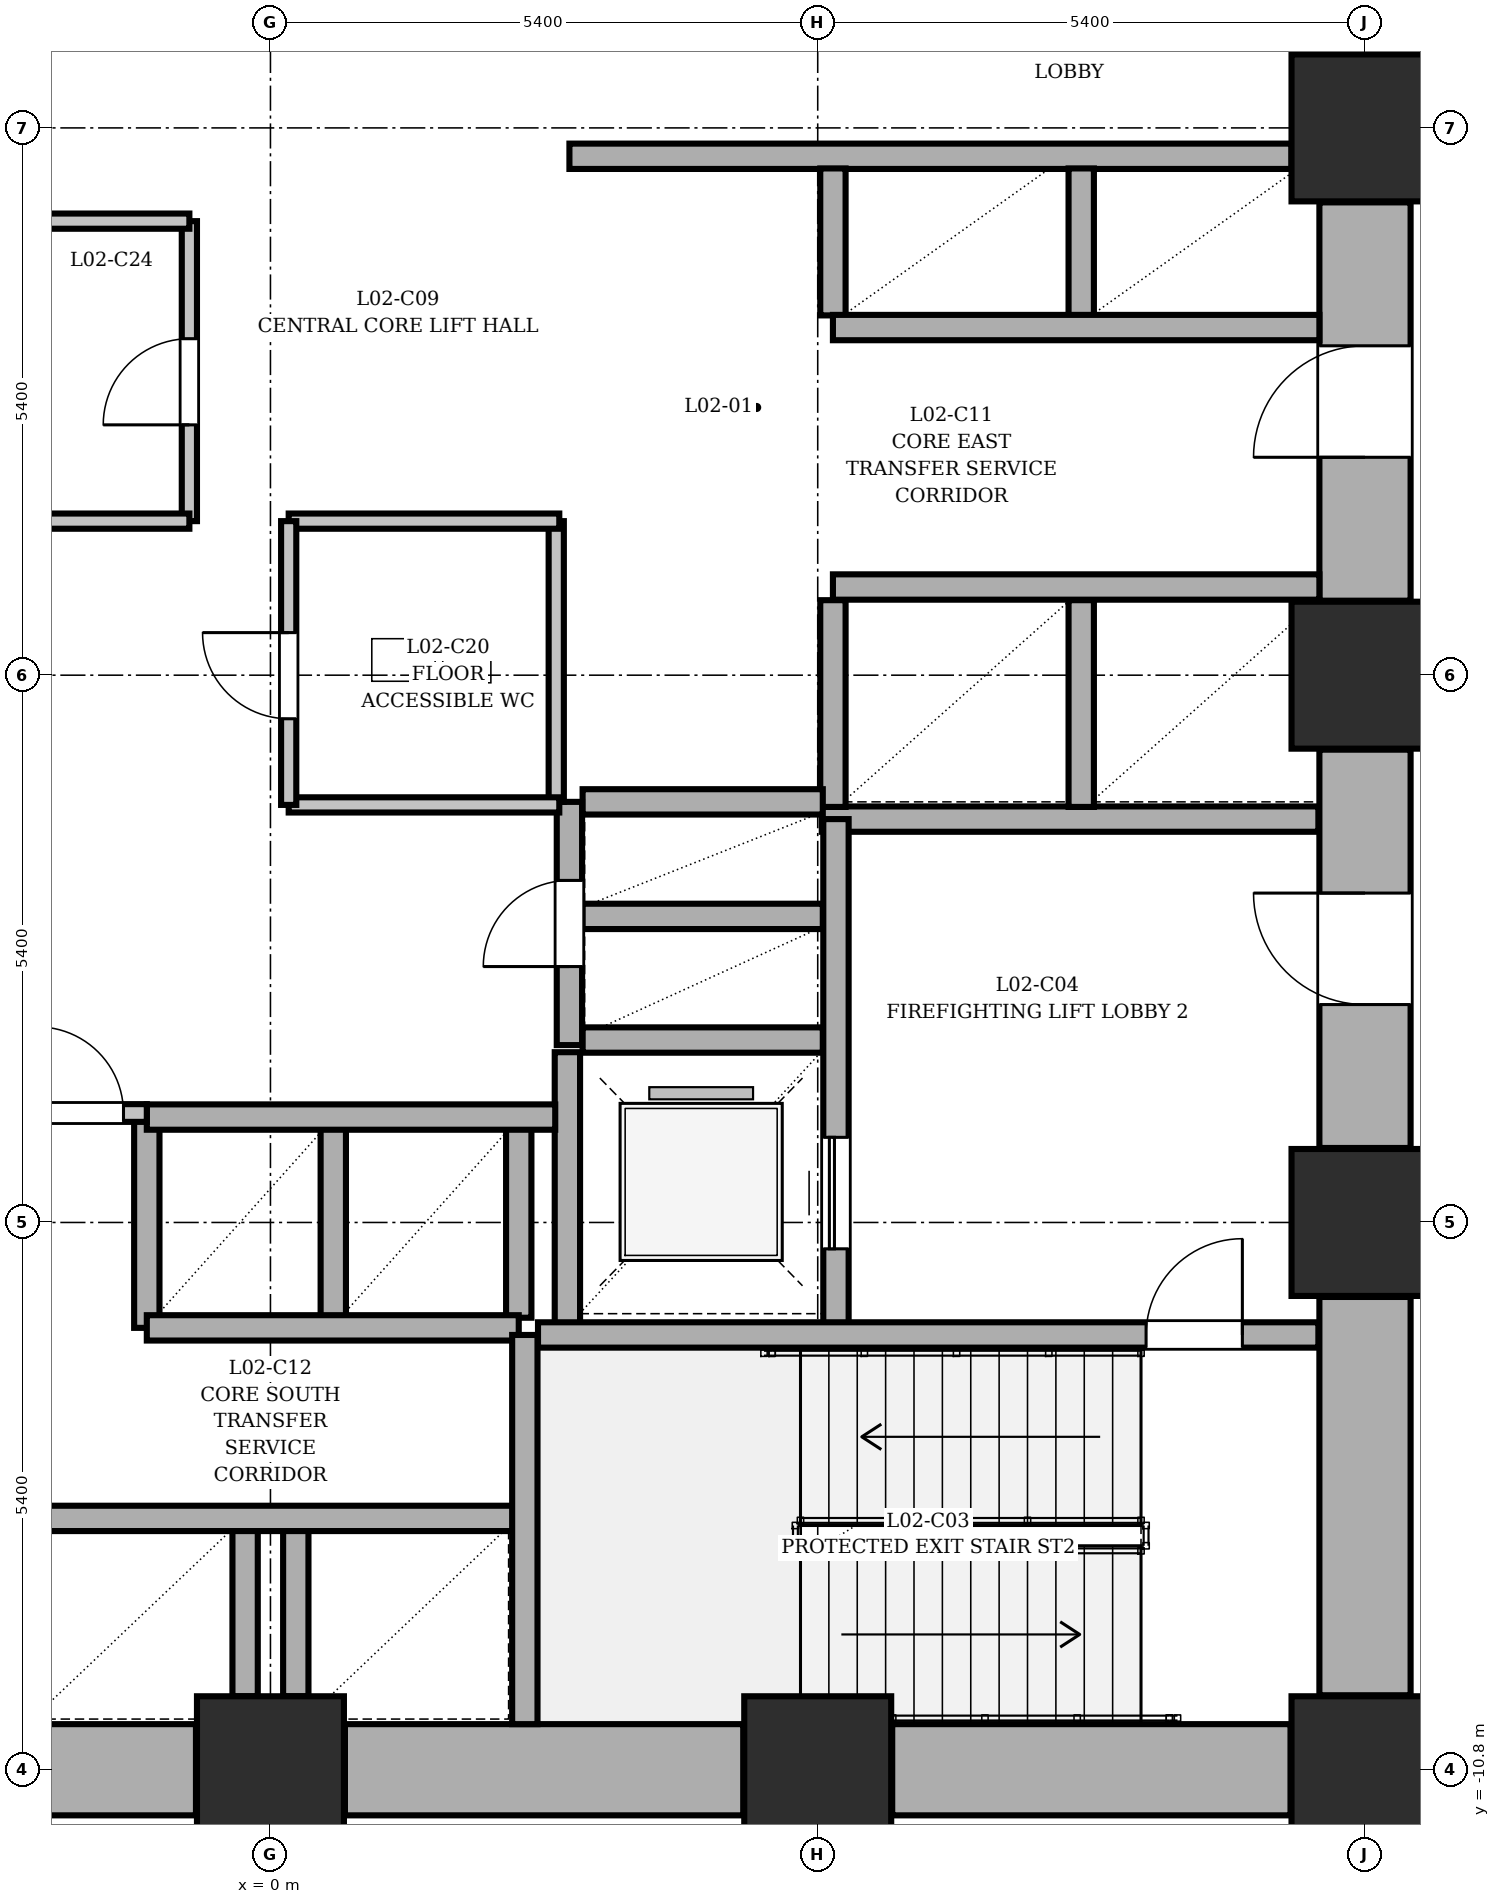
"""IFC4 building model, lengths in metres.
Left out: names, types, materials, properties, quantities, classifications, styles, units other than length and angle.
Written with IfcOpenShell. Run it as: python <this file> out.ifc"""

import sys

from ifc_helpers import new_model, si_unit, direction, frame, frame_2d, origin, origin_2d, place, context, subcontext, project, spatial, rectangle, extrude, element, fill, save


model = new_model("IFC4")
c1 = context("Model", 3, precision=1e-05, world=origin(), true_north=direction((0.0, 1.0)))
c2 = subcontext(c1, "Body", "Model", "MODEL_VIEW")
j1 = project(units=[si_unit("LENGTHUNIT", "METRE"), si_unit("PLANEANGLEUNIT", "RADIAN")], contexts=[c1])
p1 = place(None, origin())
s1 = spatial("IfcSite", under=j1, at=p1, CompositionType="ELEMENT")
p2 = place(p1, origin())
s2 = spatial("IfcBuilding", under=s1, at=p2, CompositionType="ELEMENT")
p3 = place(p2, frame((0.0, 0.0, 9.0)))
s3 = spatial("IfcBuildingStorey", under=s2, at=p3, CompositionType="ELEMENT", Elevation=9.0)
for number, where, z_axis, x_axis in (
    (1, (0.0, -10.8, 0.0), (0.0, 0.0, 1.0), (1.0, 0.0, 0.0)),
    (2, (5.4, -10.8, 0.0), (0.0, 0.0, 1.0), (1.0, 0.0, 0.0)),
    (3, (10.8, -10.8, 0.0), (0.0, 0.0, 1.0), (1.0, 0.0, 0.0)),
    (4, (10.8, -5.4, 0.0), (0.0, 0.0, 1.0), (1.0, 0.0, 0.0)),
    (5, (10.8, 0.0, 0.0), (0.0, 0.0, 1.0), (1.0, 0.0, 0.0)),
    (6, (10.8, 5.4, 0.0), (0.0, 0.0, 1.0), (1.0, 0.0, 0.0)),
):
    element("IfcColumn", number, at=place(p3, frame(where, z_axis=z_axis, x_axis=x_axis)), inside=s3, PredefinedType="COLUMN", context=c2, shape_type="SweptSolid", body=[
        extrude(rectangle(XDim=1.45, YDim=1.45, at=origin_2d()), origin(), (0.0, 0.0, 1.0), 4.5),
    ])
for number, where, z_axis, x_axis in (
    (7, (10.8, -10.065, 0.0), (0.0, 0.0, 1.0), (0.0, 1.0, 0.0)),
    (8, (-4.665, -10.8, 0.0), (0.0, 0.0, 1.0), (1.0, 0.0, 0.0)),
):
    element("IfcWall", number, at=place(p3, frame(where, z_axis=z_axis, x_axis=x_axis)), inside=s3, PredefinedType="SHEAR", context=c2, shape_type="SweptSolid", body=[
        extrude(rectangle(XDim=3.93, YDim=0.9, at=frame_2d((1.965, 0.0))), origin(), (0.0, 0.0, 1.0), 4.5),
    ])
p4 = place(p3, frame((10.8, -4.665, 0.0), z_axis=(0.0, 0.0, 1.0), x_axis=(0.0, 1.0, 0.0)))
e9 = element("IfcWall", 9, at=p4, inside=s3, PredefinedType="SHEAR", context=c2, shape_type="SweptSolid", body=[
    extrude(rectangle(XDim=3.93, YDim=0.9, at=frame_2d((1.965, 0.0))), origin(), (0.0, 0.0, 1.0), 4.5),
])
p5 = place(p4, frame((1.415, 0.0, 0.0)))
e10 = element("IfcOpeningElement", 10, at=p5, cuts=e9, PredefinedType="OPENING", context=c2, shape_type="SweptSolid", body=[
    extrude(rectangle(XDim=1.1, YDim=2.1, at=frame_2d((0.55, 1.05))), frame((0.0, 0.46, 0.0), z_axis=(0.0, -1.0, 0.0), x_axis=(1.0, 0.0, 0.0)), (0.0, 0.0, 1.0), 0.92),
])
p6 = place(p3, frame((0.735, -10.8, 0.0), z_axis=(0.0, 0.0, 1.0), x_axis=(1.0, 0.0, 0.0)))
e11 = element("IfcWall", 11, at=p6, inside=s3, PredefinedType="SHEAR", context=c2, shape_type="SweptSolid", body=[
    extrude(rectangle(XDim=3.93, YDim=0.9, at=frame_2d((1.965, 0.0))), origin(), (0.0, 0.0, 1.0), 4.5),
])
p7 = place(p3, frame((10.8, 0.735, 0.0), z_axis=(0.0, 0.0, 1.0), x_axis=(0.0, 1.0, 0.0)))
e12 = element("IfcWall", 12, at=p7, inside=s3, PredefinedType="SHEAR", context=c2, shape_type="SweptSolid", body=[
    extrude(rectangle(XDim=3.93, YDim=0.9, at=frame_2d((1.965, 0.0))), origin(), (0.0, 0.0, 1.0), 4.5),
])
p8 = place(p7, frame((1.415, 0.0, 0.0)))
e13 = element("IfcOpeningElement", 13, at=p8, cuts=e12, PredefinedType="OPENING", context=c2, shape_type="SweptSolid", body=[
    extrude(rectangle(XDim=1.1, YDim=2.1, at=frame_2d((0.55, 1.05))), frame((0.0, 0.46, 0.0), z_axis=(0.0, -1.0, 0.0), x_axis=(1.0, 0.0, 0.0)), (0.0, 0.0, 1.0), 0.92),
])
for number, where, z_axis, x_axis in (
    (14, (6.135, -10.8, 0.0), (0.0, 0.0, 1.0), (1.0, 0.0, 0.0)),
    (15, (10.8, 6.135, 0.0), (0.0, 0.0, 1.0), (0.0, 1.0, 0.0)),
):
    element("IfcWall", number, at=place(p3, frame(where, z_axis=z_axis, x_axis=x_axis)), inside=s3, PredefinedType="SHEAR", context=c2, shape_type="SweptSolid", body=[
        extrude(rectangle(XDim=3.93, YDim=0.9, at=frame_2d((1.965, 0.0))), origin(), (0.0, 0.0, 1.0), 4.5),
    ])
p9 = place(p3, frame((2.93, -6.51, 0.0), z_axis=(0.0, 0.0, 1.0), x_axis=(0.0, 1.0, 0.0)))
e16 = element("IfcWall", 16, at=p9, inside=s3, PredefinedType="SHEAR", context=c2, shape_type="SweptSolid", body=[
    extrude(rectangle(XDim=2.79, YDim=0.25, at=frame_2d((1.395, 0.0))), origin(), (0.0, 0.0, 1.0), 4.5),
])
p10 = place(p3, frame((5.44, -1.42, 0.0), z_axis=(0.0, 0.0, 1.0), x_axis=(1.0, 0.0, 0.0)))
e17 = element("IfcWall", 17, at=p10, inside=s3, PredefinedType="SHEAR", context=c2, shape_type="SweptSolid", body=[
    extrude(rectangle(XDim=4.9, YDim=0.25, at=frame_2d((2.45, 0.0))), origin(), (0.0, 0.0, 1.0), 4.5),
])
p11 = place(p3, frame((3.08, -3.6, 0.0), z_axis=(0.0, 0.0, 1.0), x_axis=(1.0, 0.0, 0.0)))
e18 = element("IfcWall", 18, at=p11, inside=s3, PredefinedType="SHEAR", context=c2, shape_type="SweptSolid", body=[
    extrude(rectangle(XDim=2.37, YDim=0.25, at=frame_2d((1.185, 0.0))), origin(), (0.0, 0.0, 1.0), 4.5),
])
p12 = place(p3, frame((5.58, -6.51, 0.0), z_axis=(0.0, 0.0, 1.0), x_axis=(0.0, 1.0, 0.0)))
e19 = element("IfcWall", 19, at=p12, inside=s3, PredefinedType="SHEAR", context=c2, shape_type="SweptSolid", body=[
    extrude(rectangle(XDim=5.09, YDim=0.25, at=frame_2d((2.545, 0.0))), origin(), (0.0, 0.0, 1.0), 4.5),
])
p13 = place(p12, frame((0.85, 0.0, 0.0)))
e20 = element("IfcOpeningElement", 20, at=p13, cuts=e19, PredefinedType="OPENING", context=c2, shape_type="SweptSolid", body=[
    extrude(rectangle(XDim=1.1, YDim=2.1, at=frame_2d((0.55, 1.05))), frame((0.0, 0.135, 0.0), z_axis=(0.0, -1.0, 0.0), x_axis=(1.0, 0.0, 0.0)), (0.0, 0.0, 1.0), 0.27),
])
for number, where, z_axis, x_axis in (
    (21, (0.62, -6.34, 0.0), (0.0, 0.0, 1.0), (0.0, 1.0, 0.0)),
    (22, (2.45, -6.34, 0.0), (0.0, 0.0, 1.0), (0.0, 1.0, 0.0)),
):
    element("IfcWall", number, at=place(p3, frame(where, z_axis=z_axis, x_axis=x_axis)), inside=s3, PredefinedType="SHEAR", context=c2, shape_type="SweptSolid", body=[
        extrude(rectangle(XDim=1.88, YDim=0.25, at=frame_2d((0.94, 0.0))), origin(), (0.0, 0.0, 1.0), 4.5),
    ])
for number, where, z_axis, x_axis in (
    (23, (-0.25, -10.075, 0.0), (0.0, 0.0, 1.0), (0.0, 1.0, 0.0)),
    (24, (0.25, -10.075, 0.0), (0.0, 0.0, 1.0), (0.0, 1.0, 0.0)),
):
    element("IfcWall", number, at=place(p3, frame(where, z_axis=z_axis, x_axis=x_axis)), inside=s3, PredefinedType="SHEAR", context=c2, shape_type="SweptSolid", body=[
        extrude(rectangle(XDim=1.635, YDim=0.25, at=frame_2d((0.817, 0.0))), origin(), (0.0, 0.0, 1.0), 4.5),
    ])
p14 = place(p3, frame((-1.22, -6.44, 0.0), z_axis=(0.0, 0.0, 1.0), x_axis=(0.0, 1.0, 0.0)))
e25 = element("IfcWall", 25, at=p14, inside=s3, PredefinedType="SHEAR", context=c2, shape_type="SweptSolid", body=[
    extrude(rectangle(XDim=2.08, YDim=0.25, at=frame_2d((1.04, 0.0))), origin(), (0.0, 0.0, 1.0), 4.5),
])
p15 = place(p3, frame((-1.22, -6.44, 0.0), z_axis=(0.0, 0.0, 1.0), x_axis=(1.0, 0.0, 0.0)))
e26 = element("IfcWall", 26, at=p15, inside=s3, PredefinedType="SHEAR", context=c2, shape_type="SweptSolid", body=[
    extrude(rectangle(XDim=3.67, YDim=0.25, at=frame_2d((1.835, 0.0))), origin(), (0.0, 0.0, 1.0), 4.5),
])
p16 = place(p3, frame((-2.48, -8.32, 0.0), z_axis=(0.0, 0.0, 1.0), x_axis=(1.0, 0.0, 0.0)))
e27 = element("IfcWall", 27, at=p16, inside=s3, PredefinedType="SHEAR", context=c2, shape_type="SweptSolid", body=[
    extrude(rectangle(XDim=4.93, YDim=0.25, at=frame_2d((2.465, 0.0))), origin(), (0.0, 0.0, 1.0), 4.5),
])
p17 = place(p3, frame((-1.22, -4.36, 0.0), z_axis=(0.0, 0.0, 1.0), x_axis=(1.0, 0.0, 0.0)))
e28 = element("IfcWall", 28, at=p17, inside=s3, PredefinedType="SHEAR", context=c2, shape_type="SweptSolid", body=[
    extrude(rectangle(XDim=4.03, YDim=0.25, at=frame_2d((2.015, 0.0))), origin(), (0.0, 0.0, 1.0), 4.5),
])
p18 = place(p3, frame((2.95, 5.12, 0.0), z_axis=(0.0, 0.0, 1.0), x_axis=(1.0, 0.0, 0.0)))
e29 = element("IfcWall", 29, at=p18, inside=s3, PredefinedType="SHEAR", context=c2, shape_type="SweptSolid", body=[
    extrude(rectangle(XDim=7.125, YDim=0.25, at=frame_2d((3.562, 0.0))), origin(), (0.0, 0.0, 1.0), 4.5),
])
for number, where, z_axis, x_axis in (
    (30, (5.55, 3.55, 0.0), (0.0, 0.0, 1.0), (0.0, 1.0, 0.0)),
    (31, (8.0, 3.55, 0.0), (0.0, 0.0, 1.0), (0.0, 1.0, 0.0)),
):
    element("IfcWall", number, at=place(p3, frame(where, z_axis=z_axis, x_axis=x_axis)), inside=s3, PredefinedType="SHEAR", context=c2, shape_type="SweptSolid", body=[
        extrude(rectangle(XDim=1.45, YDim=0.25, at=frame_2d((0.725, 0.0))), origin(), (0.0, 0.0, 1.0), 4.5),
    ])
for number, where, z_axis, x_axis in (
    (32, (5.55, -1.3, 0.0), (0.0, 0.0, 1.0), (0.0, 1.0, 0.0)),
    (33, (8.0, -1.3, 0.0), (0.0, 0.0, 1.0), (0.0, 1.0, 0.0)),
):
    element("IfcWall", number, at=place(p3, frame(where, z_axis=z_axis, x_axis=x_axis)), inside=s3, PredefinedType="SHEAR", context=c2, shape_type="SweptSolid", body=[
        extrude(rectangle(XDim=2.04, YDim=0.25, at=frame_2d((1.02, 0.0))), origin(), (0.0, 0.0, 1.0), 4.5),
    ])
for number, where, z_axis, x_axis in (
    (34, (5.55, 3.43, 0.0), (0.0, 0.0, 1.0), (1.0, 0.0, 0.0)),
    (35, (5.55, 0.87, 0.0), (0.0, 0.0, 1.0), (1.0, 0.0, 0.0)),
):
    element("IfcWall", number, at=place(p3, frame(where, z_axis=z_axis, x_axis=x_axis)), inside=s3, PredefinedType="SHEAR", context=c2, shape_type="SweptSolid", body=[
        extrude(rectangle(XDim=4.8, YDim=0.25, at=frame_2d((2.4, 0.0))), origin(), (0.0, 0.0, 1.0), 4.5),
    ])
for number, where, z_axis, x_axis in (
    (36, (3.08, -2.38, 0.0), (0.0, 0.0, 1.0), (1.0, 0.0, 0.0)),
    (37, (3.08, -1.25, 0.0), (0.0, 0.0, 1.0), (1.0, 0.0, 0.0)),
):
    element("IfcWall", number, at=place(p3, frame(where, z_axis=z_axis, x_axis=x_axis)), inside=s3, PredefinedType="SHEAR", context=c2, shape_type="SweptSolid", body=[
        extrude(rectangle(XDim=2.37, YDim=0.25, at=frame_2d((1.185, 0.0))), origin(), (0.0, 0.0, 1.0), 4.5),
    ])
p19 = place(p3, frame((2.95, -3.65, 0.0), z_axis=(0.0, 0.0, 1.0), x_axis=(0.0, 1.0, 0.0)))
e38 = element("IfcWall", 38, at=p19, inside=s3, PredefinedType="SHEAR", context=c2, shape_type="SweptSolid", body=[
    extrude(rectangle(XDim=2.4, YDim=0.25, at=frame_2d((1.2, 0.0))), origin(), (0.0, 0.0, 1.0), 4.5),
])
p20 = place(p19, frame((0.775, 0.0, 0.0)))
e39 = element("IfcOpeningElement", 39, at=p20, cuts=e38, PredefinedType="OPENING", context=c2, shape_type="SweptSolid", body=[
    extrude(rectangle(XDim=0.85, YDim=2.1, at=frame_2d((0.425, 1.05))), frame((0.0, 0.135, 0.0), z_axis=(0.0, -1.0, 0.0), x_axis=(1.0, 0.0, 0.0)), (0.0, 0.0, 1.0), 0.27),
])
p21 = place(p3, frame((2.64, -6.51, 0.0), z_axis=(0.0, 0.0, 1.0), x_axis=(1.0, 0.0, 0.0)))
e40 = element("IfcWall", 40, at=p21, inside=s3, PredefinedType="SHEAR", context=c2, shape_type="SweptSolid", body=[
    extrude(rectangle(XDim=7.7, YDim=0.25, at=frame_2d((3.85, 0.0))), origin(), (0.0, 0.0, 1.0), 4.5),
])
p22 = place(p21, frame((6.0, 0.0, 0.0)))
e41 = element("IfcOpeningElement", 41, at=p22, cuts=e40, PredefinedType="OPENING", context=c2, shape_type="SweptSolid", body=[
    extrude(rectangle(XDim=0.95, YDim=2.1, at=frame_2d((0.475, 1.05))), frame((0.0, 0.135, 0.0), z_axis=(0.0, -1.0, 0.0), x_axis=(1.0, 0.0, 0.0)), (0.0, 0.0, 1.0), 0.27),
])
p23 = place(p3, frame((2.51, -10.35, 0.0), z_axis=(0.0, 0.0, 1.0), x_axis=(0.0, 1.0, 0.0)))
e42 = element("IfcWall", 42, at=p23, inside=s3, PredefinedType="SHEAR", context=c2, shape_type="SweptSolid", body=[
    extrude(rectangle(XDim=3.84, YDim=0.25, at=frame_2d((1.92, 0.0))), origin(), (0.0, 0.0, 1.0), 4.5),
])
p24 = place(p3, frame((2.82, -1.25, 0.0), z_axis=(0.0, 0.0, 1.0), x_axis=(0.0, 1.0, 0.0)))
e43 = element("IfcWall", 43, at=p24, inside=s3, PredefinedType="PARTITIONING", context=c2, shape_type="SweptSolid", body=[
    extrude(rectangle(XDim=2.77, YDim=0.15, at=frame_2d((1.385, 0.0))), origin(), (0.0, 0.0, 1.0), 4.25),
])
for number, where, z_axis, x_axis in (
    (44, (0.18, 1.52, 0.0), (0.0, 0.0, 1.0), (1.0, 0.0, 0.0)),
    (45, (0.18, -1.28, 0.0), (0.0, 0.0, 1.0), (1.0, 0.0, 0.0)),
):
    element("IfcWall", number, at=place(p3, frame(where, z_axis=z_axis, x_axis=x_axis)), inside=s3, PredefinedType="PARTITIONING", context=c2, shape_type="SweptSolid", body=[
        extrude(rectangle(XDim=2.67, YDim=0.15, at=frame_2d((1.335, 0.0))), origin(), (0.0, 0.0, 1.0), 4.25),
    ])
p25 = place(p3, frame((0.18, -1.28, 0.0), z_axis=(0.0, 0.0, 1.0), x_axis=(0.0, 1.0, 0.0)))
e46 = element("IfcWall", 46, at=p25, inside=s3, PredefinedType="PARTITIONING", context=c2, shape_type="SweptSolid", body=[
    extrude(rectangle(XDim=2.8, YDim=0.15, at=frame_2d((1.4, 0.0))), origin(), (0.0, 0.0, 1.0), 4.25),
])
p26 = place(p25, frame((0.85, 0.0, 0.0)))
e47 = element("IfcOpeningElement", 47, at=p26, cuts=e46, PredefinedType="OPENING", context=c2, shape_type="SweptSolid", body=[
    extrude(rectangle(XDim=0.85, YDim=2.1, at=frame_2d((0.425, 1.05))), frame((0.0, 0.085, 0.0), z_axis=(0.0, -1.0, 0.0), x_axis=(1.0, 0.0, 0.0)), (0.0, 0.0, 1.0), 0.17),
])
p27 = place(p3, frame((-2.52, -4.32, 0.0), z_axis=(0.0, 0.0, 1.0), x_axis=(1.0, 0.0, 0.0)))
e48 = element("IfcWall", 48, at=p27, inside=s3, PredefinedType="PARTITIONING", context=c2, shape_type="SweptSolid", body=[
    extrude(rectangle(XDim=1.3, YDim=0.175, at=frame_2d((0.65, 0.0))), origin(), (0.0, 0.0, 1.0), 4.25),
])
p28 = place(p27, frame((0.22, 0.0, 0.0)))
e49 = element("IfcOpeningElement", 49, at=p28, cuts=e48, PredefinedType="OPENING", context=c2, shape_type="SweptSolid", body=[
    extrude(rectangle(XDim=0.85, YDim=2.1, at=frame_2d((0.425, 1.05))), frame((0.0, 0.097, 0.0), z_axis=(0.0, -1.0, 0.0), x_axis=(1.0, 0.0, 0.0)), (0.0, 0.0, 1.0), 0.195),
])
p29 = place(p3, frame((-0.8, 1.52, 0.0), z_axis=(0.0, 0.0, 1.0), x_axis=(0.0, 1.0, 0.0)))
e50 = element("IfcWall", 50, at=p29, inside=s3, PredefinedType="PARTITIONING", context=c2, shape_type="SweptSolid", body=[
    extrude(rectangle(XDim=2.96, YDim=0.15, at=frame_2d((1.48, 0.0))), origin(), (0.0, 0.0, 1.0), 4.25),
])
p30 = place(p29, frame((0.95, 0.0, 0.0)))
e51 = element("IfcOpeningElement", 51, at=p30, cuts=e50, PredefinedType="OPENING", context=c2, shape_type="SweptSolid", body=[
    extrude(rectangle(XDim=0.85, YDim=2.1, at=frame_2d((0.425, 1.05))), frame((0.0, 0.085, 0.0), z_axis=(0.0, -1.0, 0.0), x_axis=(1.0, 0.0, 0.0)), (0.0, 0.0, 1.0), 0.17),
])
for number, where, z_axis, x_axis in (
    (52, (-2.48, 4.48, 0.0), (0.0, 0.0, 1.0), (1.0, 0.0, 0.0)),
    (53, (-2.48, 1.52, 0.0), (0.0, 0.0, 1.0), (1.0, 0.0, 0.0)),
):
    element("IfcWall", number, at=place(p3, frame(where, z_axis=z_axis, x_axis=x_axis)), inside=s3, PredefinedType="PARTITIONING", context=c2, shape_type="SweptSolid", body=[
        extrude(rectangle(XDim=1.68, YDim=0.15, at=frame_2d((0.84, 0.0))), origin(), (0.0, 0.0, 1.0), 4.25),
    ])
p31 = place(p26, origin())
e54 = element("IfcDoor", 54, at=p31, inside=s3, OperationType="SINGLE_SWING_RIGHT", PredefinedType="DOOR", context=c2, shape_type="SweptSolid", body=[
    extrude(rectangle(XDim=0.85, YDim=2.1, at=frame_2d((0.425, 1.05))), frame((0.0, 0.025, 0.0), z_axis=(0.0, -1.0, 0.0), x_axis=(1.0, 0.0, 0.0)), (0.0, 0.0, 1.0), 0.05),
])
fill(e47, e54)
p32 = place(p30, origin())
e55 = element("IfcDoor", 55, at=p32, inside=s3, OperationType="SINGLE_SWING_LEFT", PredefinedType="DOOR", context=c2, shape_type="SweptSolid", body=[
    extrude(rectangle(XDim=0.85, YDim=2.1, at=frame_2d((0.425, 1.05))), frame((0.0, 0.025, 0.0), z_axis=(0.0, -1.0, 0.0), x_axis=(1.0, 0.0, 0.0)), (0.0, 0.0, 1.0), 0.05),
])
fill(e51, e55)
p33 = place(p22, origin())
e56 = element("IfcDoor", 56, at=p33, inside=s3, OperationType="SINGLE_SWING_RIGHT", PredefinedType="DOOR", context=c2, shape_type="SweptSolid", body=[
    extrude(rectangle(XDim=0.95, YDim=2.1, at=frame_2d((0.475, 1.05))), frame((0.0, 0.025, 0.0), z_axis=(0.0, -1.0, 0.0), x_axis=(1.0, 0.0, 0.0)), (0.0, 0.0, 1.0), 0.05),
])
fill(e41, e56)
p34 = place(p20, origin())
e57 = element("IfcDoor", 57, at=p34, inside=s3, OperationType="SINGLE_SWING_LEFT", PredefinedType="DOOR", context=c2, shape_type="SweptSolid", body=[
    extrude(rectangle(XDim=0.85, YDim=2.1, at=frame_2d((0.425, 1.05))), frame((0.0, 0.025, 0.0), z_axis=(0.0, -1.0, 0.0), x_axis=(1.0, 0.0, 0.0)), (0.0, 0.0, 1.0), 0.05),
])
fill(e39, e57)
p35 = place(p5, origin())
e58 = element("IfcDoor", 58, at=p35, inside=s3, OperationType="SINGLE_SWING_RIGHT", PredefinedType="DOOR", context=c2, shape_type="SweptSolid", body=[
    extrude(rectangle(XDim=1.1, YDim=2.1, at=frame_2d((0.55, 1.05))), frame((0.0, 0.025, 0.0), z_axis=(0.0, -1.0, 0.0), x_axis=(1.0, 0.0, 0.0)), (0.0, 0.0, 1.0), 0.05),
])
fill(e10, e58)
p36 = place(p13, origin())
e59 = element("IfcDoor", 59, at=p36, inside=s3, OperationType="SLIDING_TO_RIGHT", PredefinedType="DOOR", context=c2, shape_type="SweptSolid", body=[
    extrude(rectangle(XDim=1.1, YDim=2.1, at=frame_2d((0.55, 1.05))), frame((0.0, 0.025, 0.0), z_axis=(0.0, -1.0, 0.0), x_axis=(1.0, 0.0, 0.0)), (0.0, 0.0, 1.0), 0.05),
])
fill(e20, e59)
p37 = place(p8, origin())
e60 = element("IfcDoor", 60, at=p37, inside=s3, OperationType="SINGLE_SWING_LEFT", PredefinedType="DOOR", context=c2, shape_type="SweptSolid", body=[
    extrude(rectangle(XDim=1.1, YDim=2.1, at=frame_2d((0.55, 1.05))), frame((0.0, 0.025, 0.0), z_axis=(0.0, -1.0, 0.0), x_axis=(1.0, 0.0, 0.0)), (0.0, 0.0, 1.0), 0.05),
])
fill(e13, e60)
p38 = place(p28, origin())
e61 = element("IfcDoor", 61, at=p38, inside=s3, OperationType="SINGLE_SWING_LEFT", PredefinedType="DOOR", context=c2, shape_type="SweptSolid", body=[
    extrude(rectangle(XDim=0.85, YDim=2.1, at=frame_2d((0.425, 1.05))), frame((0.0, 0.025, 0.0), z_axis=(0.0, -1.0, 0.0), x_axis=(1.0, 0.0, 0.0)), (0.0, 0.0, 1.0), 0.05),
])
fill(e49, e61)
save(model, sys.argv[1])
